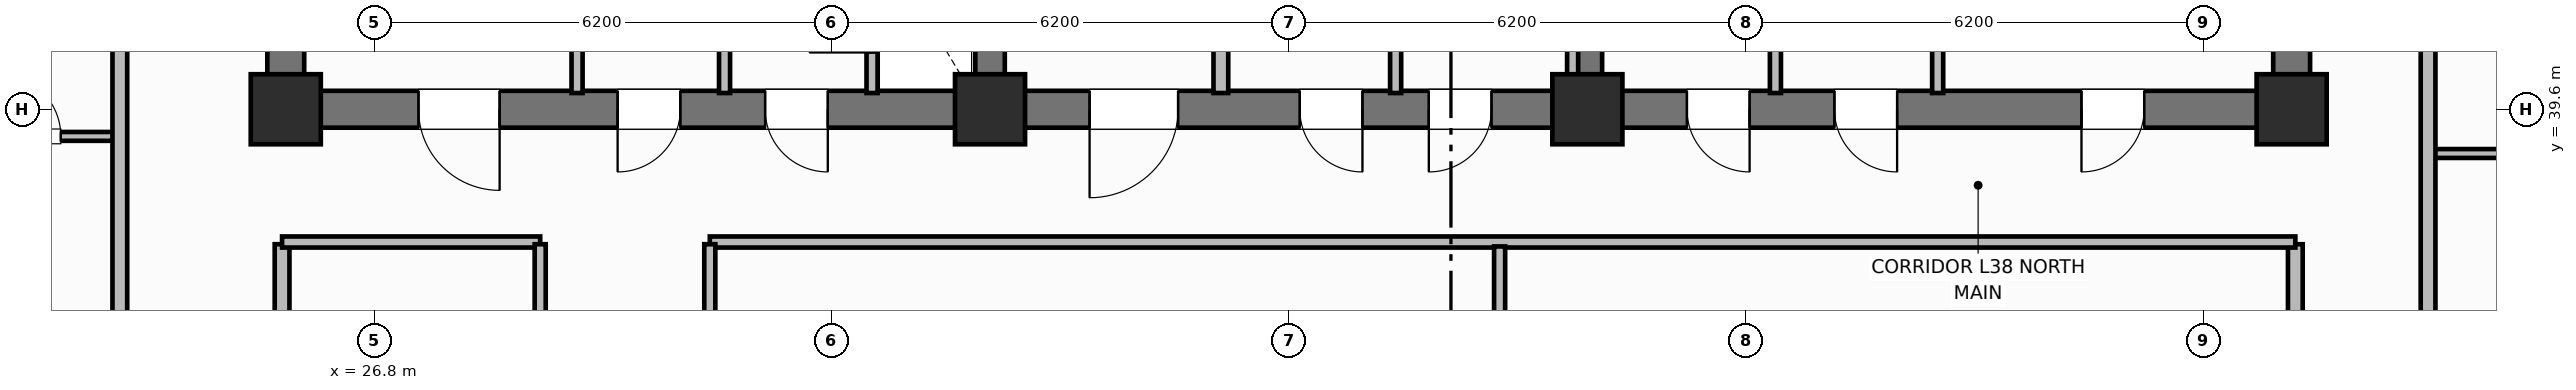
"""IFC4 building model, lengths in metres.
Left out: names, types, materials, properties, quantities, classifications, styles, units other than length and angle.
Written with IfcOpenShell. Run it as: python <this file> out.ifc"""

import sys

from ifc_helpers import new_model, si_unit, direction, frame, frame_2d, origin, origin_2d, place, context, subcontext, project, spatial, rectangle, extrude, element, fill, save


model = new_model("IFC4")
c1 = context("Model", 3, precision=1e-05, world=origin(), true_north=direction((0.0, 1.0)))
c2 = subcontext(c1, "Body", "Model", "MODEL_VIEW")
j1 = project(units=[si_unit("LENGTHUNIT", "METRE"), si_unit("PLANEANGLEUNIT", "RADIAN")], contexts=[c1])
p1 = place(None, origin())
s1 = spatial("IfcSite", under=j1, at=p1, CompositionType="ELEMENT")
p2 = place(p1, origin())
s2 = spatial("IfcBuilding", under=s1, at=p2, CompositionType="ELEMENT")
p3 = place(p2, frame((0.0, 0.0, 155.2)))
s3 = spatial("IfcBuildingStorey", under=s2, at=p3, CompositionType="ELEMENT", Elevation=155.2)
for number, where, z_axis, x_axis in (
    (1, (25.6, 39.85, 0.0), (0.0, 0.0, 1.0), (0.0, 1.0, 0.0)),
    (2, (52.8, 39.85, 0.0), (0.0, 0.0, 1.0), (0.0, 1.0, 0.0)),
):
    element("IfcWall", number, at=place(p3, frame(where, z_axis=z_axis, x_axis=x_axis)), inside=s3, PredefinedType="SHEAR", context=c2, shape_type="SweptSolid", body=[
        extrude(rectangle(XDim=5.7, YDim=0.5, at=frame_2d((2.85, 0.0))), origin(), (0.0, 0.0, 1.0), 3.7),
    ])
p4 = place(p3, frame((52.8, 39.6, 0.0), z_axis=(0.0, 0.0, 1.0), x_axis=(-1.0, 0.0, 0.0)))
e3 = element("IfcWall", 3, at=p4, inside=s3, PredefinedType="SHEAR", context=c2, shape_type="SweptSolid", body=[
    extrude(rectangle(XDim=27.2, YDim=0.5, at=frame_2d((13.6, 0.0))), origin(), (0.0, 0.0, 1.0), 3.7),
])
p5 = place(p4, frame((24.3, 0.0, 0.0)))
e4 = element("IfcOpeningElement", 4, at=p5, cuts=e3, PredefinedType="OPENING", context=c2, shape_type="SweptSolid", body=[
    extrude(rectangle(XDim=1.1, YDim=2.15, at=frame_2d((0.55, 1.075))), frame((0.0, 0.26, 0.0), z_axis=(0.0, -1.0, 0.0), x_axis=(1.0, 0.0, 0.0)), (0.0, 0.0, 1.0), 0.52),
])
p6 = place(p4, frame((21.85, 0.0, 0.0)))
e5 = element("IfcOpeningElement", 5, at=p6, cuts=e3, PredefinedType="OPENING", context=c2, shape_type="SweptSolid", body=[
    extrude(rectangle(XDim=0.85, YDim=2.1, at=frame_2d((0.425, 1.05))), frame((0.0, 0.26, 0.0), z_axis=(0.0, -1.0, 0.0), x_axis=(1.0, 0.0, 0.0)), (0.0, 0.0, 1.0), 0.52),
])
p7 = place(p4, frame((19.85, 0.0, 0.0)))
e6 = element("IfcOpeningElement", 6, at=p7, cuts=e3, PredefinedType="OPENING", context=c2, shape_type="SweptSolid", body=[
    extrude(rectangle(XDim=0.85, YDim=2.1, at=frame_2d((0.425, 1.05))), frame((0.0, 0.26, 0.0), z_axis=(0.0, -1.0, 0.0), x_axis=(1.0, 0.0, 0.0)), (0.0, 0.0, 1.0), 0.52),
])
p8 = place(p4, frame((15.1, 0.0, 0.0)))
e7 = element("IfcOpeningElement", 7, at=p8, cuts=e3, PredefinedType="OPENING", context=c2, shape_type="SweptSolid", body=[
    extrude(rectangle(XDim=1.2, YDim=2.15, at=frame_2d((0.6, 1.075))), frame((0.0, 0.26, 0.0), z_axis=(0.0, -1.0, 0.0), x_axis=(1.0, 0.0, 0.0)), (0.0, 0.0, 1.0), 0.52),
])
p9 = place(p4, frame((12.6, 0.0, 0.0)))
e8 = element("IfcOpeningElement", 8, at=p9, cuts=e3, PredefinedType="OPENING", context=c2, shape_type="SweptSolid", body=[
    extrude(rectangle(XDim=0.85, YDim=2.1, at=frame_2d((0.425, 1.05))), frame((0.0, 0.26, 0.0), z_axis=(0.0, -1.0, 0.0), x_axis=(1.0, 0.0, 0.0)), (0.0, 0.0, 1.0), 0.52),
])
p10 = place(p4, frame((10.85, 0.0, 0.0)))
e9 = element("IfcOpeningElement", 9, at=p10, cuts=e3, PredefinedType="OPENING", context=c2, shape_type="SweptSolid", body=[
    extrude(rectangle(XDim=0.85, YDim=2.1, at=frame_2d((0.425, 1.05))), frame((0.0, 0.26, 0.0), z_axis=(0.0, -1.0, 0.0), x_axis=(1.0, 0.0, 0.0)), (0.0, 0.0, 1.0), 0.52),
])
p11 = place(p4, frame((7.35, 0.0, 0.0)))
e10 = element("IfcOpeningElement", 10, at=p11, cuts=e3, PredefinedType="OPENING", context=c2, shape_type="SweptSolid", body=[
    extrude(rectangle(XDim=0.85, YDim=2.1, at=frame_2d((0.425, 1.05))), frame((0.0, 0.26, 0.0), z_axis=(0.0, -1.0, 0.0), x_axis=(1.0, 0.0, 0.0)), (0.0, 0.0, 1.0), 0.52),
])
p12 = place(p4, frame((5.35, 0.0, 0.0)))
e11 = element("IfcOpeningElement", 11, at=p12, cuts=e3, PredefinedType="OPENING", context=c2, shape_type="SweptSolid", body=[
    extrude(rectangle(XDim=0.85, YDim=2.1, at=frame_2d((0.425, 1.05))), frame((0.0, 0.26, 0.0), z_axis=(0.0, -1.0, 0.0), x_axis=(1.0, 0.0, 0.0)), (0.0, 0.0, 1.0), 0.52),
])
p13 = place(p4, frame((2.0, 0.0, 0.0)))
e12 = element("IfcOpeningElement", 12, at=p13, cuts=e3, PredefinedType="OPENING", context=c2, shape_type="SweptSolid", body=[
    extrude(rectangle(XDim=0.85, YDim=2.1, at=frame_2d((0.425, 1.05))), frame((0.0, 0.26, 0.0), z_axis=(0.0, -1.0, 0.0), x_axis=(1.0, 0.0, 0.0)), (0.0, 0.0, 1.0), 0.52),
])
for number, where, z_axis, x_axis in (
    (13, (35.15, 39.85, 0.0), (0.0, 0.0, 1.0), (0.0, 1.0, 0.0)),
    (14, (43.25, 39.85, 0.0), (0.0, 0.0, 1.0), (0.0, 1.0, 0.0)),
):
    element("IfcWall", number, at=place(p3, frame(where, z_axis=z_axis, x_axis=x_axis)), inside=s3, PredefinedType="SHEAR", context=c2, shape_type="SweptSolid", body=[
        extrude(rectangle(XDim=5.7, YDim=0.4, at=frame_2d((2.85, 0.0))), origin(), (0.0, 0.0, 1.0), 3.7),
    ])
for number, where, z_axis, x_axis in (
    (15, (25.6, 39.6, 0.0), (0.0, 0.0, 1.0), (1.0, 0.0, 0.0)),
    (16, (35.15, 39.6, 0.0), (0.0, 0.0, 1.0), (1.0, 0.0, 0.0)),
    (17, (43.25, 39.6, 0.0), (0.0, 0.0, 1.0), (1.0, 0.0, 0.0)),
    (18, (52.8, 39.6, 0.0), (0.0, 0.0, 1.0), (1.0, 0.0, 0.0)),
):
    element("IfcColumn", number, at=place(p3, frame(where, z_axis=z_axis, x_axis=x_axis)), inside=s3, PredefinedType="COLUMN", context=c2, shape_type="SweptSolid", body=[
        extrude(rectangle(XDim=0.95, YDim=0.95, at=origin_2d()), origin(), (0.0, 0.0, 1.0), 3.7),
    ])
p14 = place(p3, frame((33.55, 39.82, 0.0), z_axis=(0.0, 0.0, 1.0), x_axis=(0.0, 1.0, 0.0)))
e19 = element("IfcWall", 19, at=p14, inside=s3, PredefinedType="PARTITIONING", context=c2, shape_type="SweptSolid", body=[
    extrude(rectangle(XDim=2.13, YDim=0.15, at=frame_2d((1.065, 0.0))), origin(), (0.0, 0.0, 1.0), 2.55),
])
p15 = place(p14, frame((0.55, 0.0, 0.0)))
e20 = element("IfcOpeningElement", 20, at=p15, cuts=e19, PredefinedType="OPENING", context=c2, shape_type="SweptSolid", body=[
    extrude(rectangle(XDim=0.85, YDim=2.05, at=frame_2d((0.425, 1.025))), frame((0.0, 0.085, 0.0), z_axis=(0.0, -1.0, 0.0), x_axis=(1.0, 0.0, 0.0)), (0.0, 0.0, 1.0), 0.17),
])
for number, where, z_axis, x_axis in (
    (21, (29.55, 39.82, 0.0), (0.0, 0.0, 1.0), (0.0, 1.0, 0.0)),
    (22, (31.55, 39.82, 0.0), (0.0, 0.0, 1.0), (0.0, 1.0, 0.0)),
):
    element("IfcWall", number, at=place(p3, frame(where, z_axis=z_axis, x_axis=x_axis)), inside=s3, PredefinedType="PARTITIONING", context=c2, shape_type="SweptSolid", body=[
        extrude(rectangle(XDim=2.13, YDim=0.15, at=frame_2d((1.065, 0.0))), origin(), (0.0, 0.0, 1.0), 2.55),
    ])
p16 = place(p3, frame((38.28, 39.82, 0.0), z_axis=(0.0, 0.0, 1.0), x_axis=(0.0, 1.0, 0.0)))
e23 = element("IfcWall", 23, at=p16, inside=s3, PredefinedType="PARTITIONING", context=c2, shape_type="SweptSolid", body=[
    extrude(rectangle(XDim=5.63, YDim=0.2, at=frame_2d((2.815, 0.0))), origin(), (0.0, 0.0, 1.0), 2.55),
])
for number, where, z_axis, x_axis in (
    (24, (43.05, 39.82, 0.0), (0.0, 0.0, 1.0), (0.0, 1.0, 0.0)),
    (25, (40.65, 39.82, 0.0), (0.0, 0.0, 1.0), (0.0, 1.0, 0.0)),
    (26, (45.8, 39.82, 0.0), (0.0, 0.0, 1.0), (0.0, 1.0, 0.0)),
):
    element("IfcWall", number, at=place(p3, frame(where, z_axis=z_axis, x_axis=x_axis)), inside=s3, PredefinedType="PARTITIONING", context=c2, shape_type="SweptSolid", body=[
        extrude(rectangle(XDim=5.63, YDim=0.15, at=frame_2d((2.815, 0.0))), origin(), (0.0, 0.0, 1.0), 2.55),
    ])
p17 = place(p3, frame((48.0, 39.82, 0.0), z_axis=(0.0, 0.0, 1.0), x_axis=(0.0, 1.0, 0.0)))
e27 = element("IfcWall", 27, at=p17, inside=s3, PredefinedType="PARTITIONING", context=c2, shape_type="SweptSolid", body=[
    extrude(rectangle(XDim=2.73, YDim=0.15, at=frame_2d((1.365, 0.0))), origin(), (0.0, 0.0, 1.0), 2.55),
])
for number, where, z_axis, x_axis in (
    (28, (25.55, 18.63, 0.0), (0.0, 0.0, 1.0), (0.0, 1.0, 0.0)),
    (29, (52.85, 18.63, 0.0), (0.0, 0.0, 1.0), (0.0, 1.0, 0.0)),
):
    element("IfcWall", number, at=place(p3, frame(where, z_axis=z_axis, x_axis=x_axis)), inside=s3, PredefinedType="PARTITIONING", context=c2, shape_type="SweptSolid", body=[
        extrude(rectangle(XDim=19.14, YDim=0.2, at=frame_2d((9.57, 0.0))), origin(), (0.0, 0.0, 1.0), 2.55),
    ])
p18 = place(p3, frame((25.55, 37.8, 0.0), z_axis=(0.0, 0.0, 1.0), x_axis=(1.0, 0.0, 0.0)))
e30 = element("IfcWall", 30, at=p18, inside=s3, PredefinedType="PARTITIONING", context=c2, shape_type="SweptSolid", body=[
    extrude(rectangle(XDim=3.5, YDim=0.15, at=frame_2d((1.75, 0.0))), origin(), (0.0, 0.0, 1.0), 2.55),
])
p19 = place(p3, frame((31.35, 37.8, 0.0), z_axis=(0.0, 0.0, 1.0), x_axis=(1.0, 0.0, 0.0)))
e31 = element("IfcWall", 31, at=p19, inside=s3, PredefinedType="PARTITIONING", context=c2, shape_type="SweptSolid", body=[
    extrude(rectangle(XDim=21.5, YDim=0.15, at=frame_2d((10.75, 0.0))), origin(), (0.0, 0.0, 1.0), 2.55),
])
p20 = place(p3, frame((42.06, 18.66, 0.0), z_axis=(0.0, 0.0, 1.0), x_axis=(0.0, 1.0, 0.0)))
e32 = element("IfcWall", 32, at=p20, inside=s3, PredefinedType="PARTITIONING", context=c2, shape_type="SweptSolid", body=[
    extrude(rectangle(XDim=19.08, YDim=0.15, at=frame_2d((9.54, 0.0))), origin(), (0.0, 0.0, 1.0), 2.55),
])
p21 = place(p20, frame((6.5, 0.0, 0.0)))
e33 = element("IfcOpeningElement", 33, at=p21, cuts=e32, PredefinedType="OPENING", context=c2, shape_type="SweptSolid", body=[
    extrude(rectangle(XDim=1.0, YDim=2.15, at=frame_2d((0.5, 1.075))), frame((0.0, 0.085, 0.0), z_axis=(0.0, -1.0, 0.0), x_axis=(1.0, 0.0, 0.0)), (0.0, 0.0, 1.0), 0.17),
])
p22 = place(p3, frame((29.05, 18.63, 0.0), z_axis=(0.0, 0.0, 1.0), x_axis=(0.0, 1.0, 0.0)))
e34 = element("IfcWall", 34, at=p22, inside=s3, PredefinedType="PARTITIONING", context=c2, shape_type="SweptSolid", body=[
    extrude(rectangle(XDim=19.14, YDim=0.15, at=frame_2d((9.57, 0.0))), origin(), (0.0, 0.0, 1.0), 2.55),
])
p23 = place(p22, frame((5.5, 0.0, 0.0)))
e35 = element("IfcOpeningElement", 35, at=p23, cuts=e34, PredefinedType="OPENING", context=c2, shape_type="SweptSolid", body=[
    extrude(rectangle(XDim=1.0, YDim=2.15, at=frame_2d((0.5, 1.075))), frame((0.0, 0.085, 0.0), z_axis=(0.0, -1.0, 0.0), x_axis=(1.0, 0.0, 0.0)), (0.0, 0.0, 1.0), 0.17),
])
p24 = place(p3, frame((31.35, 18.63, 0.0), z_axis=(0.0, 0.0, 1.0), x_axis=(0.0, 1.0, 0.0)))
e36 = element("IfcWall", 36, at=p24, inside=s3, PredefinedType="PARTITIONING", context=c2, shape_type="SweptSolid", body=[
    extrude(rectangle(XDim=19.14, YDim=0.15, at=frame_2d((9.57, 0.0))), origin(), (0.0, 0.0, 1.0), 2.55),
])
p25 = place(p24, frame((5.5, 0.0, 0.0)))
e37 = element("IfcOpeningElement", 37, at=p25, cuts=e36, PredefinedType="OPENING", context=c2, shape_type="SweptSolid", body=[
    extrude(rectangle(XDim=1.0, YDim=2.15, at=frame_2d((0.5, 1.075))), frame((0.0, 0.085, 0.0), z_axis=(0.0, -1.0, 0.0), x_axis=(1.0, 0.0, 0.0)), (0.0, 0.0, 1.0), 0.17),
])
p26 = place(p3, frame((21.1, 39.232, 0.0), z_axis=(0.0, 0.0, 1.0), x_axis=(1.0, 0.0, 0.0)))
e38 = element("IfcWall", 38, at=p26, inside=s3, PredefinedType="PARTITIONING", context=c2, shape_type="SweptSolid", body=[
    extrude(rectangle(XDim=2.25, YDim=0.12, at=frame_2d((1.125, 0.0))), origin(), (0.0, 0.0, 1.0), 2.55),
])
p27 = place(p26, frame((0.6, 0.0, 0.0)))
e39 = element("IfcOpeningElement", 39, at=p27, cuts=e38, PredefinedType="OPENING", context=c2, shape_type="SweptSolid", body=[
    extrude(rectangle(XDim=0.85, YDim=2.1, at=frame_2d((0.425, 1.05))), frame((0.0, 0.07, 0.0), z_axis=(0.0, -1.0, 0.0), x_axis=(1.0, 0.0, 0.0)), (0.0, 0.0, 1.0), 0.14),
])
p28 = place(p3, frame((23.35, 10.6, 0.0), z_axis=(0.0, 0.0, 1.0), x_axis=(0.0, 1.0, 0.0)))
e40 = element("IfcWall", 40, at=p28, inside=s3, PredefinedType="PARTITIONING", context=c2, shape_type="SweptSolid", body=[
    extrude(rectangle(XDim=35.2, YDim=0.2, at=frame_2d((17.6, 0.0))), origin(), (0.0, 0.0, 1.0), 2.55),
])
p29 = place(p28, frame((2.65, 0.0, 0.0)))
e41 = element("IfcOpeningElement", 41, at=p29, cuts=e40, PredefinedType="OPENING", context=c2, shape_type="SweptSolid", body=[
    extrude(rectangle(XDim=1.0, YDim=2.15, at=frame_2d((0.5, 1.075))), frame((0.0, 0.11, 0.0), z_axis=(0.0, -1.0, 0.0), x_axis=(1.0, 0.0, 0.0)), (0.0, 0.0, 1.0), 0.22),
])
p30 = place(p28, frame((12.65, 0.0, 0.0)))
e42 = element("IfcOpeningElement", 42, at=p30, cuts=e40, PredefinedType="OPENING", context=c2, shape_type="SweptSolid", body=[
    extrude(rectangle(XDim=1.0, YDim=2.15, at=frame_2d((0.5, 1.075))), frame((0.0, 0.11, 0.0), z_axis=(0.0, -1.0, 0.0), x_axis=(1.0, 0.0, 0.0)), (0.0, 0.0, 1.0), 0.22),
])
p31 = place(p28, frame((23.782, 0.0, 0.0)))
e43 = element("IfcOpeningElement", 43, at=p31, cuts=e40, PredefinedType="OPENING", context=c2, shape_type="SweptSolid", body=[
    extrude(rectangle(XDim=1.0, YDim=2.15, at=frame_2d((0.5, 1.075))), frame((0.0, 0.11, 0.0), z_axis=(0.0, -1.0, 0.0), x_axis=(1.0, 0.0, 0.0)), (0.0, 0.0, 1.0), 0.22),
])
p32 = place(p3, frame((54.65, 39.0, 0.0), z_axis=(0.0, 0.0, 1.0), x_axis=(1.0, 0.0, 0.0)))
e44 = element("IfcWall", 44, at=p32, inside=s3, PredefinedType="PARTITIONING", context=c2, shape_type="SweptSolid", body=[
    extrude(rectangle(XDim=2.25, YDim=0.12, at=frame_2d((1.125, 0.0))), origin(), (0.0, 0.0, 1.0), 2.55),
])
p33 = place(p3, frame((54.65, 10.6, 0.0), z_axis=(0.0, 0.0, 1.0), x_axis=(0.0, 1.0, 0.0)))
e45 = element("IfcWall", 45, at=p33, inside=s3, PredefinedType="PARTITIONING", context=c2, shape_type="SweptSolid", body=[
    extrude(rectangle(XDim=35.2, YDim=0.2, at=frame_2d((17.6, 0.0))), origin(), (0.0, 0.0, 1.0), 2.55),
])
p34 = place(p33, frame((2.65, 0.0, 0.0)))
e46 = element("IfcOpeningElement", 46, at=p34, cuts=e45, PredefinedType="OPENING", context=c2, shape_type="SweptSolid", body=[
    extrude(rectangle(XDim=1.0, YDim=2.15, at=frame_2d((0.5, 1.075))), frame((0.0, 0.11, 0.0), z_axis=(0.0, -1.0, 0.0), x_axis=(1.0, 0.0, 0.0)), (0.0, 0.0, 1.0), 0.22),
])
p35 = place(p33, frame((22.75, 0.0, 0.0)))
e47 = element("IfcOpeningElement", 47, at=p35, cuts=e45, PredefinedType="OPENING", context=c2, shape_type="SweptSolid", body=[
    extrude(rectangle(XDim=1.0, YDim=2.15, at=frame_2d((0.5, 1.075))), frame((0.0, 0.11, 0.0), z_axis=(0.0, -1.0, 0.0), x_axis=(1.0, 0.0, 0.0)), (0.0, 0.0, 1.0), 0.22),
])
p36 = place(p15, origin())
e48 = element("IfcDoor", 48, at=p36, inside=s3, OperationType="SINGLE_SWING_LEFT", PredefinedType="TRAPDOOR", context=c2, shape_type="SweptSolid", body=[
    extrude(rectangle(XDim=0.85, YDim=2.05, at=frame_2d((0.425, 1.025))), frame((0.0, 0.025, 0.0), z_axis=(0.0, -1.0, 0.0), x_axis=(1.0, 0.0, 0.0)), (0.0, 0.0, 1.0), 0.05),
])
fill(e20, e48)
p37 = place(p27, origin())
e49 = element("IfcDoor", 49, at=p37, inside=s3, OperationType="SINGLE_SWING_LEFT", PredefinedType="DOOR", context=c2, shape_type="SweptSolid", body=[
    extrude(rectangle(XDim=0.85, YDim=2.1, at=frame_2d((0.425, 1.05))), frame((0.0, 0.025, 0.0), z_axis=(0.0, -1.0, 0.0), x_axis=(1.0, 0.0, 0.0)), (0.0, 0.0, 1.0), 0.05),
])
fill(e39, e49)
p38 = place(p5, origin())
e50 = element("IfcDoor", 50, at=p38, inside=s3, OperationType="SINGLE_SWING_LEFT", PredefinedType="DOOR", context=c2, shape_type="SweptSolid", body=[
    extrude(rectangle(XDim=1.1, YDim=2.15, at=frame_2d((0.55, 1.075))), frame((0.0, 0.025, 0.0), z_axis=(0.0, -1.0, 0.0), x_axis=(1.0, 0.0, 0.0)), (0.0, 0.0, 1.0), 0.05),
])
fill(e4, e50)
p39 = place(p6, origin())
e51 = element("IfcDoor", 51, at=p39, inside=s3, OperationType="SINGLE_SWING_RIGHT", PredefinedType="DOOR", context=c2, shape_type="SweptSolid", body=[
    extrude(rectangle(XDim=0.85, YDim=2.1, at=frame_2d((0.425, 1.05))), frame((0.0, 0.025, 0.0), z_axis=(0.0, -1.0, 0.0), x_axis=(1.0, 0.0, 0.0)), (0.0, 0.0, 1.0), 0.05),
])
fill(e5, e51)
p40 = place(p7, origin())
e52 = element("IfcDoor", 52, at=p40, inside=s3, OperationType="SINGLE_SWING_LEFT", PredefinedType="DOOR", context=c2, shape_type="SweptSolid", body=[
    extrude(rectangle(XDim=0.85, YDim=2.1, at=frame_2d((0.425, 1.05))), frame((0.0, 0.025, 0.0), z_axis=(0.0, -1.0, 0.0), x_axis=(1.0, 0.0, 0.0)), (0.0, 0.0, 1.0), 0.05),
])
fill(e6, e52)
p41 = place(p8, origin())
e53 = element("IfcDoor", 53, at=p41, inside=s3, OperationType="SINGLE_SWING_RIGHT", PredefinedType="DOOR", context=c2, shape_type="SweptSolid", body=[
    extrude(rectangle(XDim=1.2, YDim=2.15, at=frame_2d((0.6, 1.075))), frame((0.0, 0.025, 0.0), z_axis=(0.0, -1.0, 0.0), x_axis=(1.0, 0.0, 0.0)), (0.0, 0.0, 1.0), 0.05),
])
fill(e7, e53)
p42 = place(p9, origin())
e54 = element("IfcDoor", 54, at=p42, inside=s3, OperationType="SINGLE_SWING_LEFT", PredefinedType="DOOR", context=c2, shape_type="SweptSolid", body=[
    extrude(rectangle(XDim=0.85, YDim=2.1, at=frame_2d((0.425, 1.05))), frame((0.0, 0.025, 0.0), z_axis=(0.0, -1.0, 0.0), x_axis=(1.0, 0.0, 0.0)), (0.0, 0.0, 1.0), 0.05),
])
fill(e8, e54)
p43 = place(p10, origin())
e55 = element("IfcDoor", 55, at=p43, inside=s3, OperationType="SINGLE_SWING_RIGHT", PredefinedType="DOOR", context=c2, shape_type="SweptSolid", body=[
    extrude(rectangle(XDim=0.85, YDim=2.1, at=frame_2d((0.425, 1.05))), frame((0.0, 0.025, 0.0), z_axis=(0.0, -1.0, 0.0), x_axis=(1.0, 0.0, 0.0)), (0.0, 0.0, 1.0), 0.05),
])
fill(e9, e55)
p44 = place(p11, origin())
e56 = element("IfcDoor", 56, at=p44, inside=s3, OperationType="SINGLE_SWING_LEFT", PredefinedType="DOOR", context=c2, shape_type="SweptSolid", body=[
    extrude(rectangle(XDim=0.85, YDim=2.1, at=frame_2d((0.425, 1.05))), frame((0.0, 0.025, 0.0), z_axis=(0.0, -1.0, 0.0), x_axis=(1.0, 0.0, 0.0)), (0.0, 0.0, 1.0), 0.05),
])
fill(e10, e56)
p45 = place(p12, origin())
e57 = element("IfcDoor", 57, at=p45, inside=s3, OperationType="SINGLE_SWING_LEFT", PredefinedType="DOOR", context=c2, shape_type="SweptSolid", body=[
    extrude(rectangle(XDim=0.85, YDim=2.1, at=frame_2d((0.425, 1.05))), frame((0.0, 0.025, 0.0), z_axis=(0.0, -1.0, 0.0), x_axis=(1.0, 0.0, 0.0)), (0.0, 0.0, 1.0), 0.05),
])
fill(e11, e57)
p46 = place(p13, origin())
e58 = element("IfcDoor", 58, at=p46, inside=s3, OperationType="SINGLE_SWING_RIGHT", PredefinedType="DOOR", context=c2, shape_type="SweptSolid", body=[
    extrude(rectangle(XDim=0.85, YDim=2.1, at=frame_2d((0.425, 1.05))), frame((0.0, 0.025, 0.0), z_axis=(0.0, -1.0, 0.0), x_axis=(1.0, 0.0, 0.0)), (0.0, 0.0, 1.0), 0.05),
])
fill(e12, e58)
save(model, sys.argv[1])
